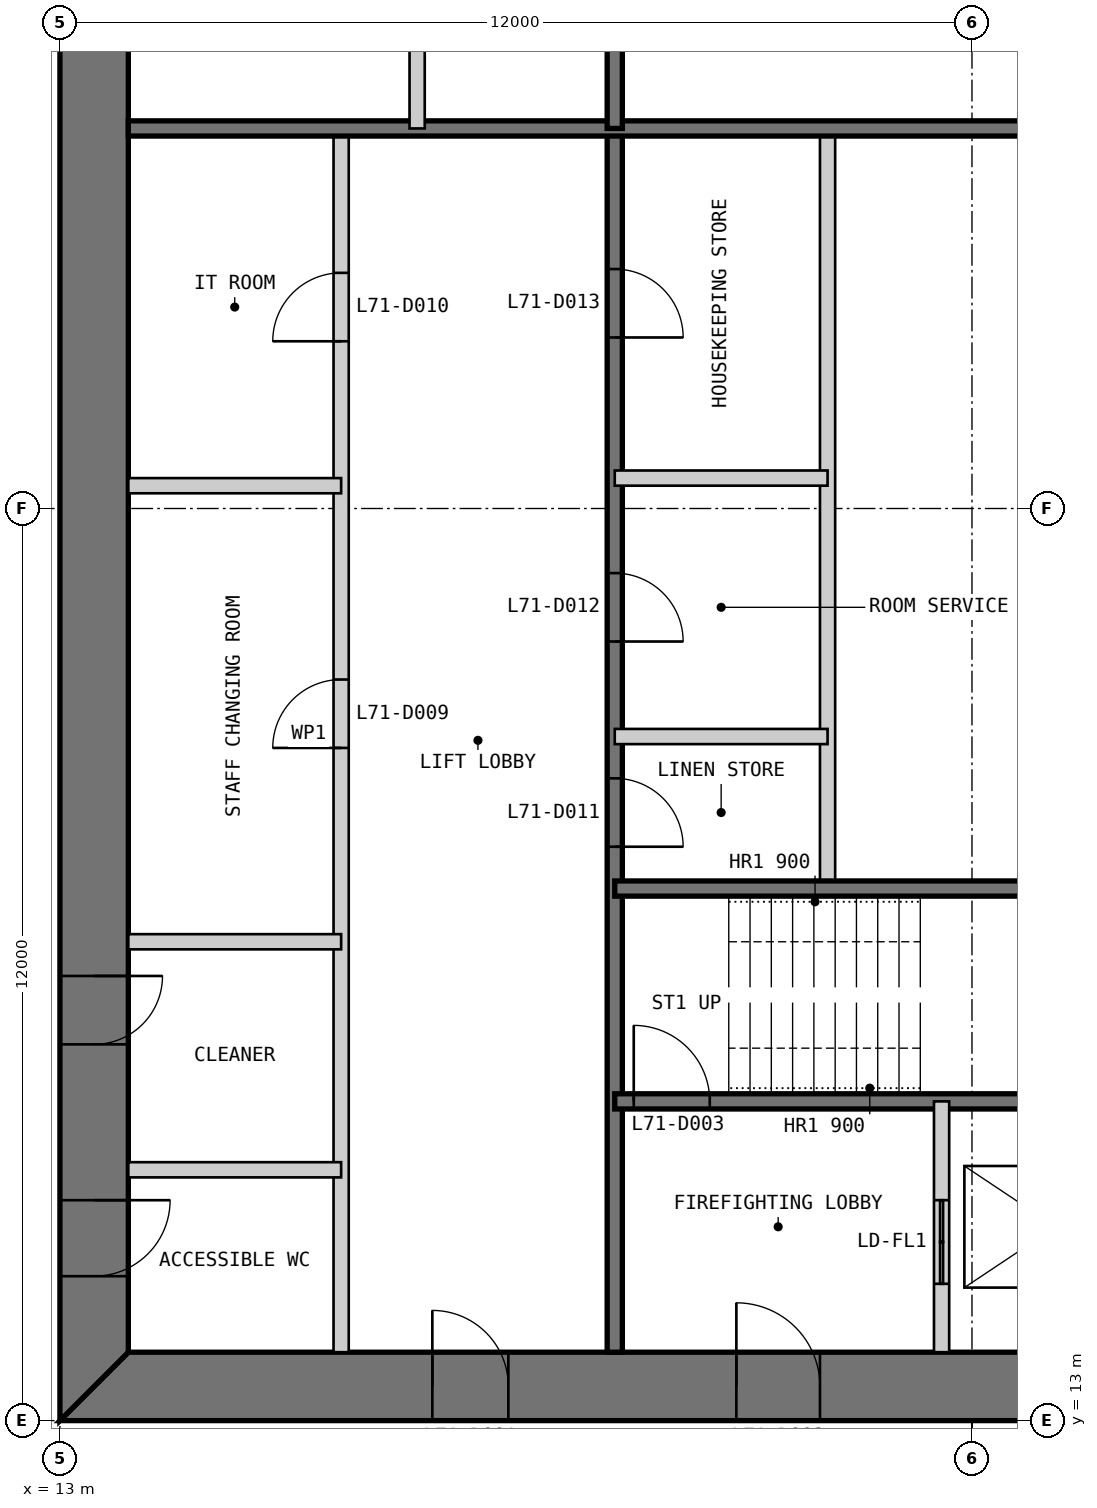
"""IFC4 building model, lengths in metres.
Left out: names, types, materials, properties, quantities, classifications, styles, units other than length and angle.
Written with IfcOpenShell. Run it as: python <this file> out.ifc"""

import sys

from ifc_helpers import new_model, si_unit, direction, frame, frame_2d, origin, place, context, subcontext, project, spatial, polyline, rectangle, outline, extrude, element, fill, save


model = new_model("IFC4")
c1 = context("Model", 3, precision=1e-05, world=origin(), true_north=direction((0.0, 1.0)))
c2 = subcontext(c1, "Body", "Model", "MODEL_VIEW")
j1 = project(units=[si_unit("LENGTHUNIT", "METRE"), si_unit("PLANEANGLEUNIT", "RADIAN")], contexts=[c1])
p1 = place(None, origin())
s1 = spatial("IfcSite", under=j1, at=p1, CompositionType="ELEMENT")
p2 = place(p1, origin())
s2 = spatial("IfcBuilding", under=s1, at=p2, CompositionType="ELEMENT")
p3 = place(p2, frame((0.0, 0.0, 293.4)))
s3 = spatial("IfcBuildingStorey", under=s2, at=p3, CompositionType="ELEMENT", Elevation=293.4)
p4 = place(p3, frame((13.0, 13.45, 0.0), z_axis=(0.0, 0.0, 1.0), x_axis=(1.0, 0.0, 0.0)))
e1 = element("IfcWall", 1, at=p4, inside=s3, PredefinedType="SHEAR", context=c2, shape_type="SweptSolid", body=[
    extrude(outline(polyline([(0.0, -0.45), (24.0, -0.45), (23.1, 0.45), (0.9, 0.45), (0.0, -0.45)])), origin(), (0.0, 0.0, 1.0), 3.4),
])
p5 = place(p4, frame((4.9, 0.0, 0.0)))
e2 = element("IfcOpeningElement", 2, at=p5, cuts=e1, PredefinedType="OPENING", context=c2, shape_type="SweptSolid", body=[
    extrude(rectangle(XDim=1.0, YDim=2.2, at=frame_2d((0.5, 1.1))), frame((0.0, 0.46, 0.0), z_axis=(0.0, -1.0, 0.0), x_axis=(1.0, 0.0, 0.0)), (0.0, 0.0, 1.0), 0.92),
])
p6 = place(p4, frame((8.9, 0.0, 0.0)))
e3 = element("IfcOpeningElement", 3, at=p6, cuts=e1, PredefinedType="OPENING", context=c2, shape_type="SweptSolid", body=[
    extrude(rectangle(XDim=1.1, YDim=2.2, at=frame_2d((0.55, 1.1))), frame((0.0, 0.46, 0.0), z_axis=(0.0, -1.0, 0.0), x_axis=(1.0, 0.0, 0.0)), (0.0, 0.0, 1.0), 0.92),
])
p7 = place(p4, frame((15.05, 0.0, 0.0)))
e4 = element("IfcOpeningElement", 4, at=p7, cuts=e1, PredefinedType="OPENING", context=c2, shape_type="SweptSolid", body=[
    extrude(rectangle(XDim=0.9, YDim=2.2, at=frame_2d((0.45, 1.1))), frame((0.0, 0.46, 0.0), z_axis=(0.0, -1.0, 0.0), x_axis=(1.0, 0.0, 0.0)), (0.0, 0.0, 1.0), 0.92),
])
p8 = place(p4, frame((17.9, 0.0, 0.0)))
e5 = element("IfcOpeningElement", 5, at=p8, cuts=e1, PredefinedType="OPENING", context=c2, shape_type="SweptSolid", body=[
    extrude(rectangle(XDim=1.0, YDim=2.2, at=frame_2d((0.5, 1.1))), frame((0.0, 0.46, 0.0), z_axis=(0.0, -1.0, 0.0), x_axis=(1.0, 0.0, 0.0)), (0.0, 0.0, 1.0), 0.92),
])
p9 = place(p4, frame((21.4, 0.0, 0.0)))
e6 = element("IfcOpeningElement", 6, at=p9, cuts=e1, PredefinedType="OPENING", context=c2, shape_type="SweptSolid", body=[
    extrude(rectangle(XDim=1.0, YDim=2.2, at=frame_2d((0.5, 1.1))), frame((0.0, 0.46, 0.0), z_axis=(0.0, -1.0, 0.0), x_axis=(1.0, 0.0, 0.0)), (0.0, 0.0, 1.0), 0.92),
])
p10 = place(p3, frame((13.45, 36.1, 0.0), z_axis=(0.0, 0.0, 1.0), x_axis=(0.0, -1.0, 0.0)))
e7 = element("IfcWall", 7, at=p10, inside=s3, PredefinedType="SHEAR", context=c2, shape_type="SweptSolid", body=[
    extrude(outline(polyline([(-0.9, -0.45), (23.1, -0.45), (22.2, 0.45), (0.0, 0.45), (-0.9, -0.45)])), origin(), (0.0, 0.0, 1.0), 3.4),
])
p11 = place(p10, frame((20.2, 0.0, 0.0)))
e8 = element("IfcOpeningElement", 8, at=p11, cuts=e7, PredefinedType="OPENING", context=c2, shape_type="SweptSolid", body=[
    extrude(rectangle(XDim=1.0, YDim=2.2, at=frame_2d((0.5, 1.1))), frame((0.0, 0.46, 0.0), z_axis=(0.0, -1.0, 0.0), x_axis=(1.0, 0.0, 0.0)), (0.0, 0.0, 1.0), 0.92),
])
p12 = place(p10, frame((17.25, 0.0, 0.0)))
e9 = element("IfcOpeningElement", 9, at=p12, cuts=e7, PredefinedType="OPENING", context=c2, shape_type="SweptSolid", body=[
    extrude(rectangle(XDim=0.9, YDim=2.2, at=frame_2d((0.45, 1.1))), frame((0.0, 0.46, 0.0), z_axis=(0.0, -1.0, 0.0), x_axis=(1.0, 0.0, 0.0)), (0.0, 0.0, 1.0), 0.92),
])
p13 = place(p3, frame((16.7, 13.9, 0.0), z_axis=(0.0, 0.0, 1.0), x_axis=(0.0, 1.0, 0.0)))
e10 = element("IfcWall", 10, at=p13, inside=s3, PredefinedType="PARTITIONING", context=c2, shape_type="SweptSolid", body=[
    extrude(rectangle(XDim=16.1, YDim=0.2, at=frame_2d((8.05, 0.0))), origin(), (0.0, 0.0, 1.0), 3.2),
])
p14 = place(p13, frame((7.95, 0.0, 0.0)))
e11 = element("IfcOpeningElement", 11, at=p14, cuts=e10, PredefinedType="OPENING", context=c2, shape_type="SweptSolid", body=[
    extrude(rectangle(XDim=0.9, YDim=2.2, at=frame_2d((0.45, 1.1))), frame((0.0, 0.11, 0.0), z_axis=(0.0, -1.0, 0.0), x_axis=(1.0, 0.0, 0.0)), (0.0, 0.0, 1.0), 0.22),
])
p15 = place(p13, frame((13.3, 0.0, 0.0)))
e12 = element("IfcOpeningElement", 12, at=p15, cuts=e10, PredefinedType="OPENING", context=c2, shape_type="SweptSolid", body=[
    extrude(rectangle(XDim=0.9, YDim=2.2, at=frame_2d((0.45, 1.1))), frame((0.0, 0.11, 0.0), z_axis=(0.0, -1.0, 0.0), x_axis=(1.0, 0.0, 0.0)), (0.0, 0.0, 1.0), 0.22),
])
p16 = place(p3, frame((20.3, 13.9, 0.0), z_axis=(0.0, 0.0, 1.0), x_axis=(0.0, 1.0, 0.0)))
e13 = element("IfcWall", 13, at=p16, inside=s3, PredefinedType="SOLIDWALL", context=c2, shape_type="SweptSolid", body=[
    extrude(rectangle(XDim=16.1, YDim=0.2, at=frame_2d((8.05, 0.0))), origin(), (0.0, 0.0, 1.0), 3.2),
])
p17 = place(p16, frame((6.65, 0.0, 0.0)))
e14 = element("IfcOpeningElement", 14, at=p17, cuts=e13, PredefinedType="OPENING", context=c2, shape_type="SweptSolid", body=[
    extrude(rectangle(XDim=0.9, YDim=2.2, at=frame_2d((0.45, 1.1))), frame((0.0, 0.11, 0.0), z_axis=(0.0, -1.0, 0.0), x_axis=(1.0, 0.0, 0.0)), (0.0, 0.0, 1.0), 0.22),
])
p18 = place(p16, frame((9.35, 0.0, 0.0)))
e15 = element("IfcOpeningElement", 15, at=p18, cuts=e13, PredefinedType="OPENING", context=c2, shape_type="SweptSolid", body=[
    extrude(rectangle(XDim=0.9, YDim=2.2, at=frame_2d((0.45, 1.1))), frame((0.0, 0.11, 0.0), z_axis=(0.0, -1.0, 0.0), x_axis=(1.0, 0.0, 0.0)), (0.0, 0.0, 1.0), 0.22),
])
p19 = place(p16, frame((13.35, 0.0, 0.0)))
e16 = element("IfcOpeningElement", 16, at=p19, cuts=e13, PredefinedType="OPENING", context=c2, shape_type="SweptSolid", body=[
    extrude(rectangle(XDim=0.9, YDim=2.2, at=frame_2d((0.45, 1.1))), frame((0.0, 0.11, 0.0), z_axis=(0.0, -1.0, 0.0), x_axis=(1.0, 0.0, 0.0)), (0.0, 0.0, 1.0), 0.22),
])
p20 = place(p3, frame((23.1, 20.0, 0.0), z_axis=(0.0, 0.0, 1.0), x_axis=(0.0, 1.0, 0.0)))
e17 = element("IfcWall", 17, at=p20, inside=s3, PredefinedType="PARTITIONING", context=c2, shape_type="SweptSolid", body=[
    extrude(rectangle(XDim=10.0, YDim=0.2, at=frame_2d((5.0, 0.0))), origin(), (0.0, 0.0, 1.0), 3.2),
])
p21 = place(p3, frame((20.3, 17.2, 0.0), z_axis=(0.0, 0.0, 1.0), x_axis=(1.0, 0.0, 0.0)))
e18 = element("IfcWall", 18, at=p21, inside=s3, PredefinedType="SOLIDWALL", context=c2, shape_type="SweptSolid", body=[
    extrude(rectangle(XDim=9.4, YDim=0.2, at=frame_2d((4.7, 0.0))), origin(), (0.0, 0.0, 1.0), 3.2),
])
p22 = place(p21, frame((0.25, 0.0, 0.0)))
e19 = element("IfcOpeningElement", 19, at=p22, cuts=e18, PredefinedType="OPENING", context=c2, shape_type="SweptSolid", body=[
    extrude(rectangle(XDim=1.0, YDim=2.2, at=frame_2d((0.5, 1.1))), frame((0.0, 0.11, 0.0), z_axis=(0.0, -1.0, 0.0), x_axis=(1.0, 0.0, 0.0)), (0.0, 0.0, 1.0), 0.22),
])
p23 = place(p3, frame((20.3, 20.0, 0.0), z_axis=(0.0, 0.0, 1.0), x_axis=(1.0, 0.0, 0.0)))
e20 = element("IfcWall", 20, at=p23, inside=s3, PredefinedType="SOLIDWALL", context=c2, shape_type="SweptSolid", body=[
    extrude(rectangle(XDim=15.8, YDim=0.2, at=frame_2d((7.9, 0.0))), origin(), (0.0, 0.0, 1.0), 3.2),
])
p24 = place(p3, frame((24.6, 13.9, 0.0), z_axis=(0.0, 0.0, 1.0), x_axis=(0.0, 1.0, 0.0)))
e21 = element("IfcWall", 21, at=p24, inside=s3, PredefinedType="PARTITIONING", context=c2, shape_type="SweptSolid", body=[
    extrude(rectangle(XDim=3.3, YDim=0.2, at=frame_2d((1.65, 0.0))), origin(), (0.0, 0.0, 1.0), 3.2),
])
p25 = place(p24, frame((0.9, 0.0, 0.0)))
e22 = element("IfcOpeningElement", 22, at=p25, cuts=e21, PredefinedType="OPENING", context=c2, shape_type="SweptSolid", body=[
    extrude(rectangle(XDim=1.1, YDim=2.2, at=frame_2d((0.55, 1.1))), frame((0.0, 0.11, 0.0), z_axis=(0.0, -1.0, 0.0), x_axis=(1.0, 0.0, 0.0)), (0.0, 0.0, 1.0), 0.22),
])
for number, where, z_axis, x_axis in (
    (23, (13.9, 16.3, 0.0), (0.0, 0.0, 1.0), (1.0, 0.0, 0.0)),
    (24, (13.9, 19.3, 0.0), (0.0, 0.0, 1.0), (1.0, 0.0, 0.0)),
    (25, (13.9, 25.3, 0.0), (0.0, 0.0, 1.0), (1.0, 0.0, 0.0)),
    (26, (20.3, 22.0, 0.0), (0.0, 0.0, 1.0), (1.0, 0.0, 0.0)),
    (27, (20.3, 25.4, 0.0), (0.0, 0.0, 1.0), (1.0, 0.0, 0.0)),
):
    element("IfcWall", number, at=place(p3, frame(where, z_axis=z_axis, x_axis=x_axis)), inside=s3, PredefinedType="PARTITIONING", context=c2, shape_type="SweptSolid", body=[
        extrude(rectangle(XDim=2.8, YDim=0.2, at=frame_2d((1.4, 0.0))), origin(), (0.0, 0.0, 1.0), 3.2),
    ])
p26 = place(p3, frame((29.7, 30.0, 0.0), z_axis=(0.0, 0.0, 1.0), x_axis=(-1.0, 0.0, 0.0)))
e28 = element("IfcWall", 28, at=p26, inside=s3, PredefinedType="SOLIDWALL", context=c2, shape_type="SweptSolid", body=[
    extrude(rectangle(XDim=15.8, YDim=0.2, at=frame_2d((7.9, 0.0))), origin(), (0.0, 0.0, 1.0), 3.2),
])
p27 = place(p3, frame((20.3, 36.1, 0.0), z_axis=(0.0, 0.0, 1.0), x_axis=(0.0, -1.0, 0.0)))
e29 = element("IfcWall", 29, at=p27, inside=s3, PredefinedType="SOLIDWALL", context=c2, shape_type="SweptSolid", body=[
    extrude(rectangle(XDim=6.1, YDim=0.2, at=frame_2d((3.05, 0.0))), origin(), (0.0, 0.0, 1.0), 3.2),
])
p28 = place(p3, frame((17.7, 36.1, 0.0), z_axis=(0.0, 0.0, 1.0), x_axis=(0.0, -1.0, 0.0)))
e30 = element("IfcWall", 30, at=p28, inside=s3, PredefinedType="PARTITIONING", context=c2, shape_type="SweptSolid", body=[
    extrude(rectangle(XDim=6.1, YDim=0.2, at=frame_2d((3.05, 0.0))), origin(), (0.0, 0.0, 1.0), 3.2),
])
p29 = place(p5, origin())
e31 = element("IfcDoor", 31, at=p29, inside=s3, OperationType="SINGLE_SWING_LEFT", PredefinedType="DOOR", context=c2, shape_type="SweptSolid", body=[
    extrude(rectangle(XDim=1.0, YDim=2.2, at=frame_2d((0.5, 1.1))), frame((0.0, 0.025, 0.0), z_axis=(0.0, -1.0, 0.0), x_axis=(1.0, 0.0, 0.0)), (0.0, 0.0, 1.0), 0.05),
    extrude(outline(polyline([(0.0, 0.0), (0.04, 0.0), (0.04, 2.16), (0.96, 2.16), (0.96, 0.0), (1.0, 0.0), (1.0, 2.2), (0.0, 2.2), (0.0, 0.0)])), frame((0.0, 0.3, 0.0), z_axis=(0.0, -1.0, 0.0), x_axis=(1.0, 0.0, 0.0)), (0.0, 0.0, 1.0), 0.6),
])
fill(e2, e31)
p30 = place(p6, origin())
e32 = element("IfcDoor", 32, at=p30, inside=s3, OperationType="SINGLE_SWING_LEFT", PredefinedType="DOOR", context=c2, shape_type="SweptSolid", body=[
    extrude(rectangle(XDim=1.1, YDim=2.2, at=frame_2d((0.55, 1.1))), frame((0.0, 0.025, 0.0), z_axis=(0.0, -1.0, 0.0), x_axis=(1.0, 0.0, 0.0)), (0.0, 0.0, 1.0), 0.05),
    extrude(outline(polyline([(0.0, 0.0), (0.04, 0.0), (0.04, 2.16), (1.06, 2.16), (1.06, 0.0), (1.1, 0.0), (1.1, 2.2), (0.0, 2.2), (0.0, 0.0)])), frame((0.0, 0.3, 0.0), z_axis=(0.0, -1.0, 0.0), x_axis=(1.0, 0.0, 0.0)), (0.0, 0.0, 1.0), 0.6),
])
fill(e3, e32)
p31 = place(p22, origin())
e33 = element("IfcDoor", 33, at=p31, inside=s3, OperationType="SINGLE_SWING_LEFT", PredefinedType="DOOR", context=c2, shape_type="SweptSolid", body=[
    extrude(rectangle(XDim=1.0, YDim=2.2, at=frame_2d((0.5, 1.1))), frame((0.0, 0.025, 0.0), z_axis=(0.0, -1.0, 0.0), x_axis=(1.0, 0.0, 0.0)), (0.0, 0.0, 1.0), 0.05),
])
fill(e19, e33)
p32 = place(p11, origin())
e34 = element("IfcDoor", 34, at=p32, inside=s3, OperationType="SINGLE_SWING_LEFT", PredefinedType="DOOR", context=c2, shape_type="SweptSolid", body=[
    extrude(rectangle(XDim=1.0, YDim=2.2, at=frame_2d((0.5, 1.1))), frame((0.0, 0.025, 0.0), z_axis=(0.0, -1.0, 0.0), x_axis=(1.0, 0.0, 0.0)), (0.0, 0.0, 1.0), 0.05),
    extrude(outline(polyline([(0.0, 0.0), (0.04, 0.0), (0.04, 2.16), (0.96, 2.16), (0.96, 0.0), (1.0, 0.0), (1.0, 2.2), (0.0, 2.2), (0.0, 0.0)])), frame((0.0, 0.3, 0.0), z_axis=(0.0, -1.0, 0.0), x_axis=(1.0, 0.0, 0.0)), (0.0, 0.0, 1.0), 0.6),
])
fill(e8, e34)
p33 = place(p12, origin())
e35 = element("IfcDoor", 35, at=p33, inside=s3, OperationType="SINGLE_SWING_LEFT", PredefinedType="DOOR", context=c2, shape_type="SweptSolid", body=[
    extrude(rectangle(XDim=0.9, YDim=2.2, at=frame_2d((0.45, 1.1))), frame((0.0, 0.025, 0.0), z_axis=(0.0, -1.0, 0.0), x_axis=(1.0, 0.0, 0.0)), (0.0, 0.0, 1.0), 0.05),
    extrude(outline(polyline([(0.0, 0.0), (0.04, 0.0), (0.04, 2.16), (0.86, 2.16), (0.86, 0.0), (0.9, 0.0), (0.9, 2.2), (0.0, 2.2), (0.0, 0.0)])), frame((0.0, 0.3, 0.0), z_axis=(0.0, -1.0, 0.0), x_axis=(1.0, 0.0, 0.0)), (0.0, 0.0, 1.0), 0.6),
])
fill(e9, e35)
p34 = place(p14, origin())
e36 = element("IfcDoor", 36, at=p34, inside=s3, OperationType="SINGLE_SWING_LEFT", PredefinedType="DOOR", context=c2, shape_type="SweptSolid", body=[
    extrude(rectangle(XDim=0.9, YDim=2.2, at=frame_2d((0.45, 1.1))), frame((0.0, 0.025, 0.0), z_axis=(0.0, -1.0, 0.0), x_axis=(1.0, 0.0, 0.0)), (0.0, 0.0, 1.0), 0.05),
])
fill(e11, e36)
p35 = place(p15, origin())
e37 = element("IfcDoor", 37, at=p35, inside=s3, OperationType="SINGLE_SWING_LEFT", PredefinedType="DOOR", context=c2, shape_type="SweptSolid", body=[
    extrude(rectangle(XDim=0.9, YDim=2.2, at=frame_2d((0.45, 1.1))), frame((0.0, 0.025, 0.0), z_axis=(0.0, -1.0, 0.0), x_axis=(1.0, 0.0, 0.0)), (0.0, 0.0, 1.0), 0.05),
])
fill(e12, e37)
p36 = place(p17, frame((0.9, 0.0, 0.0), z_axis=(0.0, 0.0, 1.0), x_axis=(-1.0, 0.0, 0.0)))
e38 = element("IfcDoor", 38, at=p36, inside=s3, OperationType="SINGLE_SWING_RIGHT", PredefinedType="DOOR", context=c2, shape_type="SweptSolid", body=[
    extrude(rectangle(XDim=0.9, YDim=2.2, at=frame_2d((0.45, 1.1))), frame((0.0, 0.025, 0.0), z_axis=(0.0, -1.0, 0.0), x_axis=(1.0, 0.0, 0.0)), (0.0, 0.0, 1.0), 0.05),
])
fill(e14, e38)
p37 = place(p18, frame((0.9, 0.0, 0.0), z_axis=(0.0, 0.0, 1.0), x_axis=(-1.0, 0.0, 0.0)))
e39 = element("IfcDoor", 39, at=p37, inside=s3, OperationType="SINGLE_SWING_RIGHT", PredefinedType="DOOR", context=c2, shape_type="SweptSolid", body=[
    extrude(rectangle(XDim=0.9, YDim=2.2, at=frame_2d((0.45, 1.1))), frame((0.0, 0.025, 0.0), z_axis=(0.0, -1.0, 0.0), x_axis=(1.0, 0.0, 0.0)), (0.0, 0.0, 1.0), 0.05),
])
fill(e15, e39)
p38 = place(p19, frame((0.9, 0.0, 0.0), z_axis=(0.0, 0.0, 1.0), x_axis=(-1.0, 0.0, 0.0)))
e40 = element("IfcDoor", 40, at=p38, inside=s3, OperationType="SINGLE_SWING_RIGHT", PredefinedType="DOOR", context=c2, shape_type="SweptSolid", body=[
    extrude(rectangle(XDim=0.9, YDim=2.2, at=frame_2d((0.45, 1.1))), frame((0.0, 0.025, 0.0), z_axis=(0.0, -1.0, 0.0), x_axis=(1.0, 0.0, 0.0)), (0.0, 0.0, 1.0), 0.05),
])
fill(e16, e40)
p39 = place(p25, origin())
e41 = element("IfcDoor", 41, at=p39, inside=s3, OperationType="DOUBLE_DOOR_SLIDING", PredefinedType="DOOR", context=c2, shape_type="SweptSolid", body=[
    extrude(rectangle(XDim=1.1, YDim=2.2, at=frame_2d((0.55, 1.1))), frame((0.0, 0.025, 0.0), z_axis=(0.0, -1.0, 0.0), x_axis=(1.0, 0.0, 0.0)), (0.0, 0.0, 1.0), 0.05),
])
fill(e22, e41)
save(model, sys.argv[1])
